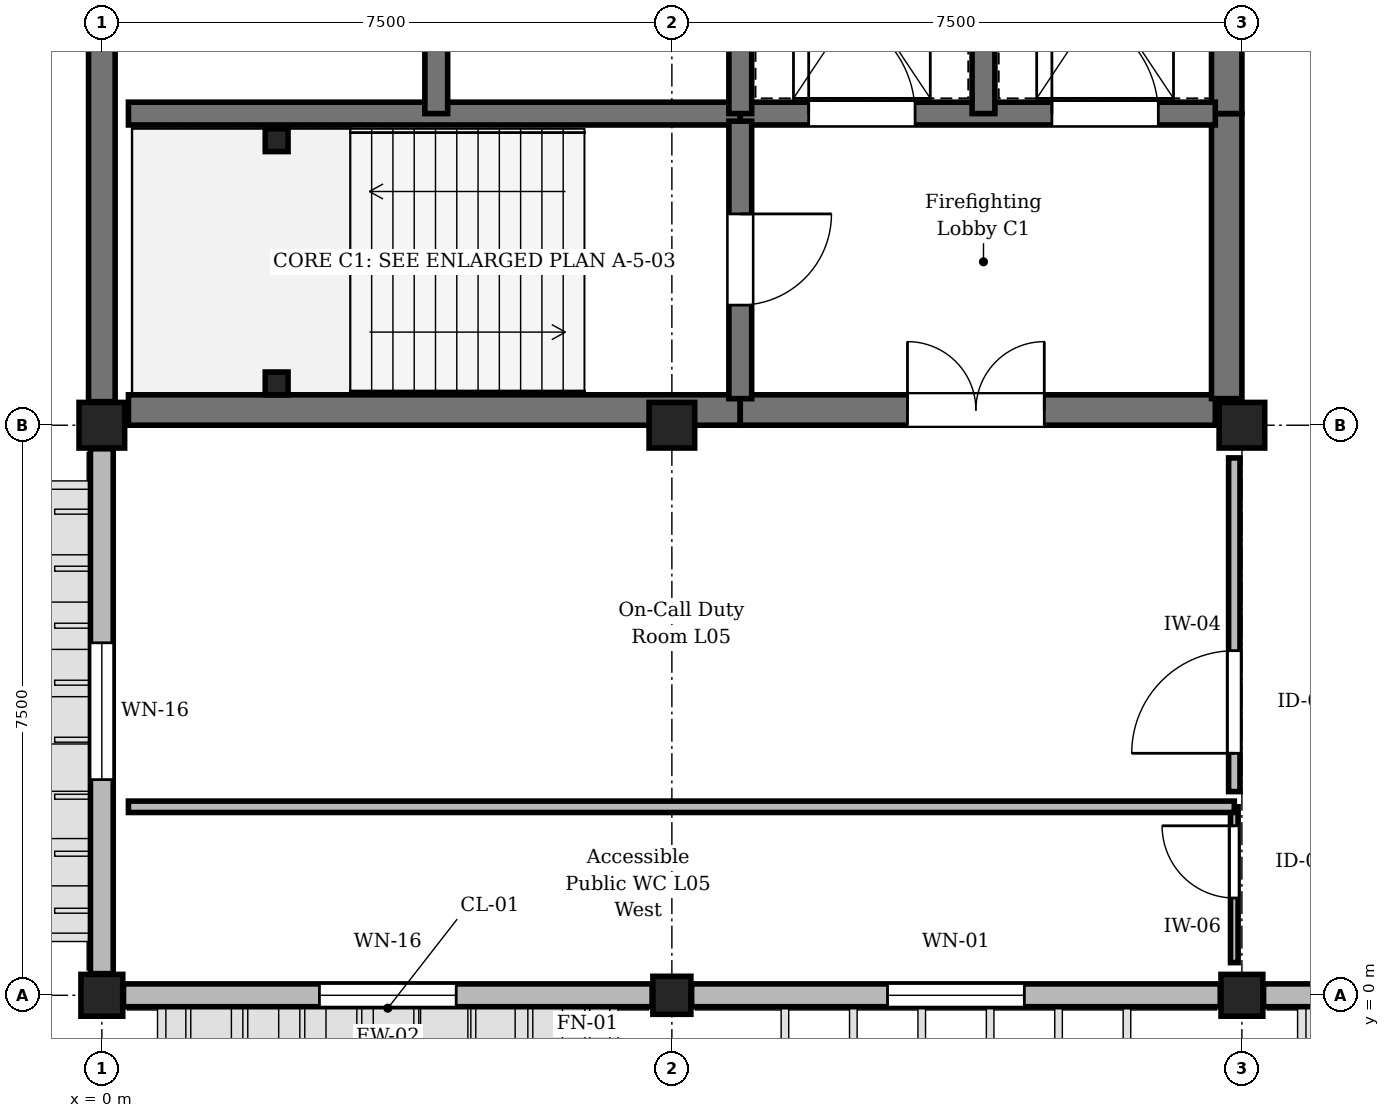
"""IFC4 building model, lengths in metres.
Left out: names, types, materials, properties, quantities, classifications, styles, units other than length and angle.
Written with IfcOpenShell. Run it as: python <this file> out.ifc"""

import sys

from ifc_helpers import new_model, si_unit, direction, frame, frame_2d, origin, origin_with_axes, origin_2d, place, context, subcontext, project, spatial, rectangle, circle, i_section, extrude, element, fill, save


model = new_model("IFC4")
c1 = context("Model", 3, precision=1e-05, world=origin(), true_north=direction((0.0, 1.0)))
c2 = subcontext(c1, "Body", "Model", "MODEL_VIEW")
j1 = project(units=[si_unit("LENGTHUNIT", "METRE"), si_unit("PLANEANGLEUNIT", "RADIAN")], contexts=[c1])
p1 = place(None, origin())
s1 = spatial("IfcSite", under=j1, at=p1, CompositionType="ELEMENT")
p2 = place(p1, origin())
s2 = spatial("IfcBuilding", under=s1, at=p2, CompositionType="ELEMENT")
p3 = place(p2, frame((0.0, 0.0, 21.9)))
s3 = spatial("IfcBuildingStorey", under=s2, at=p3, CompositionType="ELEMENT", Elevation=21.9)
p4 = place(p3, origin_with_axes())
e1 = element("IfcColumn", 1, at=p4, inside=s3, PredefinedType="COLUMN", context=c2, shape_type="SweptSolid", body=[
    extrude(rectangle(XDim=0.55, YDim=0.55, at=origin_2d()), origin(), (0.0, 0.0, 1.0), 4.05),
])
p5 = place(p3, frame((0.0, 7.5, 0.0), z_axis=(0.0, 0.0, 1.0), x_axis=(1.0, 0.0, 0.0)))
e2 = element("IfcColumn", 2, at=p5, inside=s3, PredefinedType="COLUMN", context=c2, shape_type="SweptSolid", body=[
    extrude(rectangle(XDim=0.6, YDim=0.6, at=origin_2d()), origin(), (0.0, 0.0, 1.0), 4.05),
])
p6 = place(p3, frame((7.5, 0.0, 0.0), z_axis=(0.0, 0.0, 1.0), x_axis=(1.0, 0.0, 0.0)))
e3 = element("IfcColumn", 3, at=p6, inside=s3, PredefinedType="COLUMN", context=c2, shape_type="SweptSolid", body=[
    extrude(rectangle(XDim=0.5, YDim=0.5, at=origin_2d()), origin(), (0.0, 0.0, 1.0), 4.05),
])
p7 = place(p3, frame((7.5, 7.5, 0.0), z_axis=(0.0, 0.0, 1.0), x_axis=(1.0, 0.0, 0.0)))
e4 = element("IfcColumn", 4, at=p7, inside=s3, PredefinedType="COLUMN", context=c2, shape_type="SweptSolid", body=[
    extrude(rectangle(XDim=0.6, YDim=0.6, at=origin_2d()), origin(), (0.0, 0.0, 1.0), 4.05),
])
p8 = place(p3, frame((15.0, 0.0, 0.0), z_axis=(0.0, 0.0, 1.0), x_axis=(1.0, 0.0, 0.0)))
e5 = element("IfcColumn", 5, at=p8, inside=s3, PredefinedType="COLUMN", context=c2, shape_type="SweptSolid", body=[
    extrude(rectangle(XDim=0.55, YDim=0.55, at=origin_2d()), origin(), (0.0, 0.0, 1.0), 4.05),
])
p9 = place(p3, frame((15.0, 7.5, 0.0), z_axis=(0.0, 0.0, 1.0), x_axis=(1.0, 0.0, 0.0)))
e6 = element("IfcColumn", 6, at=p9, inside=s3, PredefinedType="COLUMN", context=c2, shape_type="SweptSolid", body=[
    extrude(circle(Radius=0.3, at=origin_2d()), origin(), (0.0, 0.0, 1.0), 4.05),
])
for number, where, z_axis, x_axis in (
    (7, (2.3, 8.05, 0.0), (0.0, 0.0, 1.0), (1.0, 0.0, 0.0)),
    (8, (2.3, 11.25, 0.0), (0.0, 0.0, 1.0), (1.0, 0.0, 0.0)),
):
    element("IfcColumn", number, at=place(p3, frame(where, z_axis=z_axis, x_axis=x_axis)), inside=s3, PredefinedType="COLUMN", context=c2, shape_type="SweptSolid", body=[
        extrude(i_section(OverallWidth=0.3, OverallDepth=0.3, WebThickness=0.011, FlangeThickness=0.019, FilletRadius=0.027, at=origin_2d()), origin(), (0.0, 0.0, 1.0), 4.05),
    ])
p10 = place(p3, frame((7.24, 0.0, 0.0), z_axis=(0.0, 0.0, 1.0), x_axis=(-1.0, 0.0, 0.0)))
e9 = element("IfcWall", 9, at=p10, inside=s3, PredefinedType="STANDARD", context=c2, shape_type="SweptSolid", body=[
    extrude(rectangle(XDim=6.955, YDim=0.3, at=frame_2d((3.478, 0.0))), origin(), (0.0, 0.0, 1.0), 3.17),
])
p11 = place(p10, frame((2.577, 0.0, 0.9)))
e10 = element("IfcOpeningElement", 10, at=p11, cuts=e9, PredefinedType="OPENING", context=c2, shape_type="SweptSolid", body=[
    extrude(rectangle(XDim=1.8, YDim=1.8, at=frame_2d((0.9, 0.9))), frame((0.0, 0.16, 0.0), z_axis=(0.0, -1.0, 0.0), x_axis=(1.0, 0.0, 0.0)), (0.0, 0.0, 1.0), 0.32),
])
p12 = place(p3, frame((0.0, 0.285, 0.0), z_axis=(0.0, 0.0, 1.0), x_axis=(0.0, 1.0, 0.0)))
e11 = element("IfcWall", 11, at=p12, inside=s3, PredefinedType="STANDARD", context=c2, shape_type="SweptSolid", body=[
    extrude(rectangle(XDim=6.905, YDim=0.3, at=frame_2d((3.453, 0.0))), origin(), (0.0, 0.0, 1.0), 3.17),
])
p13 = place(p12, frame((2.552, 0.0, 0.9)))
e12 = element("IfcOpeningElement", 12, at=p13, cuts=e11, PredefinedType="OPENING", context=c2, shape_type="SweptSolid", body=[
    extrude(rectangle(XDim=1.8, YDim=1.8, at=frame_2d((0.9, 0.9))), frame((0.0, 0.16, 0.0), z_axis=(0.0, -1.0, 0.0), x_axis=(1.0, 0.0, 0.0)), (0.0, 0.0, 1.0), 0.32),
])
p14 = place(p3, frame((0.0, 7.81, 0.0), z_axis=(0.0, 0.0, 1.0), x_axis=(0.0, 1.0, 0.0)))
e13 = element("IfcWall", 13, at=p14, inside=s3, PredefinedType="SHEAR", context=c2, shape_type="SweptSolid", body=[
    extrude(rectangle(XDim=6.88, YDim=0.35, at=frame_2d((3.44, 0.0))), origin(), (0.0, 0.0, 1.0), 3.77),
])
p15 = place(p3, frame((14.715, 0.0, 0.0), z_axis=(0.0, 0.0, 1.0), x_axis=(-1.0, 0.0, 0.0)))
e14 = element("IfcWall", 14, at=p15, inside=s3, PredefinedType="STANDARD", context=c2, shape_type="SweptSolid", body=[
    extrude(rectangle(XDim=6.955, YDim=0.3, at=frame_2d((3.478, 0.0))), origin(), (0.0, 0.0, 1.0), 3.17),
])
p16 = place(p15, frame((2.577, 0.0, 0.9)))
e15 = element("IfcOpeningElement", 15, at=p16, cuts=e14, PredefinedType="OPENING", context=c2, shape_type="SweptSolid", body=[
    extrude(rectangle(XDim=1.8, YDim=1.99, at=frame_2d((0.9, 0.995))), frame((0.0, 0.16, 0.0), z_axis=(0.0, -1.0, 0.0), x_axis=(1.0, 0.0, 0.0)), (0.0, 0.0, 1.0), 0.32),
])
p17 = place(p3, frame((22.24, 0.0, 0.0), z_axis=(0.0, 0.0, 1.0), x_axis=(-1.0, 0.0, 0.0)))
e16 = element("IfcWall", 16, at=p17, inside=s3, PredefinedType="STANDARD", context=c2, shape_type="SweptSolid", body=[
    extrude(rectangle(XDim=6.955, YDim=0.3, at=frame_2d((3.478, 0.0))), origin(), (0.0, 0.0, 1.0), 3.17),
])
p18 = place(p17, frame((2.728, 0.0, 0.9)))
e17 = element("IfcOpeningElement", 17, at=p18, cuts=e16, PredefinedType="OPENING", context=c2, shape_type="SweptSolid", body=[
    extrude(rectangle(XDim=1.5, YDim=1.99, at=frame_2d((0.75, 0.995))), frame((0.0, 0.16, 0.0), z_axis=(0.0, -1.0, 0.0), x_axis=(1.0, 0.0, 0.0)), (0.0, 0.0, 1.0), 0.32),
])
p19 = place(p3, frame((0.35, 7.7, 0.0), z_axis=(0.0, 0.0, 1.0), x_axis=(1.0, 0.0, 0.0)))
e18 = element("IfcWall", 18, at=p19, inside=s3, PredefinedType="SHEAR", context=c2, shape_type="SweptSolid", body=[
    extrude(rectangle(XDim=8.05, YDim=0.4, at=frame_2d((4.025, 0.0))), origin(), (0.0, 0.0, 1.0), 3.77),
])
p20 = place(p3, frame((8.4, 7.7, 0.0), z_axis=(0.0, 0.0, 1.0), x_axis=(1.0, 0.0, 0.0)))
e19 = element("IfcWall", 19, at=p20, inside=s3, PredefinedType="SHEAR", context=c2, shape_type="SweptSolid", body=[
    extrude(rectangle(XDim=6.25, YDim=0.4, at=frame_2d((3.125, 0.0))), origin(), (0.0, 0.0, 1.0), 3.77),
])
p21 = place(p20, frame((2.2, 0.0, 0.0)))
e20 = element("IfcOpeningElement", 20, at=p21, cuts=e19, PredefinedType="OPENING", context=c2, shape_type="SweptSolid", body=[
    extrude(rectangle(XDim=1.8, YDim=2.25, at=frame_2d((0.9, 1.125))), frame((0.0, 0.21, 0.0), z_axis=(0.0, -1.0, 0.0), x_axis=(1.0, 0.0, 0.0)), (0.0, 0.0, 1.0), 0.42),
])
p22 = place(p3, frame((14.8, 7.85, 0.0), z_axis=(0.0, 0.0, 1.0), x_axis=(0.0, 1.0, 0.0)))
e21 = element("IfcWall", 21, at=p22, inside=s3, PredefinedType="SHEAR", context=c2, shape_type="SweptSolid", body=[
    extrude(rectangle(XDim=3.75, YDim=0.4, at=frame_2d((1.875, 0.0))), origin(), (0.0, 0.0, 1.0), 3.77),
])
p23 = place(p3, frame((14.8, 11.6, 0.0), z_axis=(0.0, 0.0, 1.0), x_axis=(0.0, 1.0, 0.0)))
e22 = element("IfcWall", 22, at=p23, inside=s3, PredefinedType="SHEAR", context=c2, shape_type="SweptSolid", body=[
    extrude(rectangle(XDim=3.05, YDim=0.4, at=frame_2d((1.525, 0.0))), origin(), (0.0, 0.0, 1.0), 3.77),
])
p24 = place(p3, frame((0.35, 11.6, 0.0), z_axis=(0.0, 0.0, 1.0), x_axis=(1.0, 0.0, 0.0)))
e23 = element("IfcWall", 23, at=p24, inside=s3, PredefinedType="SHEAR", context=c2, shape_type="SweptSolid", body=[
    extrude(rectangle(XDim=8.05, YDim=0.3, at=frame_2d((4.025, 0.0))), origin(), (0.0, 0.0, 1.0), 3.77),
])
p25 = place(p3, frame((8.4, 11.6, 0.0), z_axis=(0.0, 0.0, 1.0), x_axis=(1.0, 0.0, 0.0)))
e24 = element("IfcWall", 24, at=p25, inside=s3, PredefinedType="SHEAR", context=c2, shape_type="SweptSolid", body=[
    extrude(rectangle(XDim=6.25, YDim=0.3, at=frame_2d((3.125, 0.0))), origin(), (0.0, 0.0, 1.0), 3.77),
])
p26 = place(p25, frame((0.9, 0.0, 0.0)))
e25 = element("IfcOpeningElement", 25, at=p26, cuts=e24, PredefinedType="OPENING", context=c2, shape_type="SweptSolid", body=[
    extrude(rectangle(XDim=1.4, YDim=2.25, at=frame_2d((0.7, 1.125))), frame((0.0, 0.16, 0.0), z_axis=(0.0, -1.0, 0.0), x_axis=(1.0, 0.0, 0.0)), (0.0, 0.0, 1.0), 0.32),
])
p27 = place(p25, frame((4.1, 0.0, 0.0)))
e26 = element("IfcOpeningElement", 26, at=p27, cuts=e24, PredefinedType="OPENING", context=c2, shape_type="SweptSolid", body=[
    extrude(rectangle(XDim=1.4, YDim=2.25, at=frame_2d((0.7, 1.125))), frame((0.0, 0.16, 0.0), z_axis=(0.0, -1.0, 0.0), x_axis=(1.0, 0.0, 0.0)), (0.0, 0.0, 1.0), 0.32),
])
p28 = place(p3, frame((8.4, 11.5, 0.0), z_axis=(0.0, 0.0, 1.0), x_axis=(0.0, -1.0, 0.0)))
e27 = element("IfcWall", 27, at=p28, inside=s3, PredefinedType="SHEAR", context=c2, shape_type="SweptSolid", body=[
    extrude(rectangle(XDim=3.65, YDim=0.3, at=frame_2d((1.825, 0.0))), origin(), (0.0, 0.0, 1.0), 3.77),
])
p29 = place(p28, frame((1.22, 0.0, 0.0)))
e28 = element("IfcOpeningElement", 28, at=p29, cuts=e27, PredefinedType="OPENING", context=c2, shape_type="SweptSolid", body=[
    extrude(rectangle(XDim=1.2, YDim=2.25, at=frame_2d((0.6, 1.125))), frame((0.0, 0.16, 0.0), z_axis=(0.0, -1.0, 0.0), x_axis=(1.0, 0.0, 0.0)), (0.0, 0.0, 1.0), 0.32),
])
for number, where, z_axis, x_axis in (
    (29, (4.4, 11.6, 0.0), (0.0, 0.0, 1.0), (0.0, 1.0, 0.0)),
    (30, (8.4, 11.6, 0.0), (0.0, 0.0, 1.0), (0.0, 1.0, 0.0)),
    (31, (11.6, 11.6, 0.0), (0.0, 0.0, 1.0), (0.0, 1.0, 0.0)),
):
    element("IfcWall", number, at=place(p3, frame(where, z_axis=z_axis, x_axis=x_axis)), inside=s3, PredefinedType="SHEAR", context=c2, shape_type="SweptSolid", body=[
        extrude(rectangle(XDim=3.15, YDim=0.3, at=frame_2d((1.575, 0.0))), origin(), (0.0, 0.0, 1.0), 3.77),
    ])
p30 = place(p3, frame((14.9, 0.43, 0.0), z_axis=(0.0, 0.0, 1.0), x_axis=(0.0, 1.0, 0.0)))
e32 = element("IfcWall", 32, at=p30, inside=s3, PredefinedType="PARTITIONING", context=c2, shape_type="SweptSolid", body=[
    extrude(rectangle(XDim=2.05, YDim=0.1, at=frame_2d((1.025, 0.0))), origin(), (0.0, 0.0, 1.0), 3.205),
])
p31 = place(p30, frame((0.85, 0.0, 0.0)))
e33 = element("IfcOpeningElement", 33, at=p31, cuts=e32, PredefinedType="OPENING", context=c2, shape_type="SweptSolid", body=[
    extrude(rectangle(XDim=0.95, YDim=2.15, at=frame_2d((0.475, 1.075))), frame((0.0, 0.06, 0.0), z_axis=(0.0, -1.0, 0.0), x_axis=(1.0, 0.0, 0.0)), (0.0, 0.0, 1.0), 0.12),
])
p32 = place(p3, frame((14.9, 2.68, 0.0), z_axis=(0.0, 0.0, 1.0), x_axis=(0.0, 1.0, 0.0)))
e34 = element("IfcWall", 34, at=p32, inside=s3, PredefinedType="PARTITIONING", context=c2, shape_type="SweptSolid", body=[
    extrude(rectangle(XDim=4.39, YDim=0.15, at=frame_2d((2.195, 0.0))), origin(), (0.0, 0.0, 1.0), 3.205),
])
p33 = place(p32, frame((0.504, 0.0, 0.0)))
e35 = element("IfcOpeningElement", 35, at=p33, cuts=e34, PredefinedType="OPENING", context=c2, shape_type="SweptSolid", body=[
    extrude(rectangle(XDim=1.35, YDim=2.25, at=frame_2d((0.675, 1.125))), frame((0.0, 0.085, 0.0), z_axis=(0.0, -1.0, 0.0), x_axis=(1.0, 0.0, 0.0)), (0.0, 0.0, 1.0), 0.17),
])
p34 = place(p3, frame((0.35, 2.48, 0.0), z_axis=(0.0, 0.0, 1.0), x_axis=(1.0, 0.0, 0.0)))
e36 = element("IfcWall", 36, at=p34, inside=s3, PredefinedType="PARTITIONING", context=c2, shape_type="SweptSolid", body=[
    extrude(rectangle(XDim=14.55, YDim=0.15, at=frame_2d((7.275, 0.0))), origin(), (0.0, 0.0, 1.0), 3.755),
])
p35 = place(p11, origin())
e37 = element("IfcWindow", 37, at=p35, inside=s3, PartitioningType="SINGLE_PANEL", PredefinedType="WINDOW", context=c2, shape_type="SweptSolid", body=[
    extrude(rectangle(XDim=1.8, YDim=1.8, at=frame_2d((0.9, 0.9))), frame((0.0, 0.03, 0.0), z_axis=(0.0, -1.0, 0.0), x_axis=(1.0, 0.0, 0.0)), (0.0, 0.0, 1.0), 0.06),
])
fill(e10, e37)
p36 = place(p13, origin())
e38 = element("IfcWindow", 38, at=p36, inside=s3, PartitioningType="SINGLE_PANEL", PredefinedType="WINDOW", context=c2, shape_type="SweptSolid", body=[
    extrude(rectangle(XDim=1.8, YDim=1.8, at=frame_2d((0.9, 0.9))), frame((0.0, 0.03, 0.0), z_axis=(0.0, -1.0, 0.0), x_axis=(1.0, 0.0, 0.0)), (0.0, 0.0, 1.0), 0.06),
])
fill(e12, e38)
p37 = place(p16, origin())
e39 = element("IfcWindow", 39, at=p37, inside=s3, PartitioningType="SINGLE_PANEL", PredefinedType="WINDOW", context=c2, shape_type="SweptSolid", body=[
    extrude(rectangle(XDim=1.8, YDim=1.99, at=frame_2d((0.9, 0.995))), frame((0.0, 0.03, 0.0), z_axis=(0.0, -1.0, 0.0), x_axis=(1.0, 0.0, 0.0)), (0.0, 0.0, 1.0), 0.06),
])
fill(e15, e39)
p38 = place(p21, origin())
e40 = element("IfcDoor", 40, at=p38, inside=s3, OperationType="DOUBLE_DOOR_SINGLE_SWING", PredefinedType="DOOR", context=c2, shape_type="SweptSolid", body=[
    extrude(rectangle(XDim=1.8, YDim=2.25, at=frame_2d((0.9, 1.125))), frame((0.0, 0.025, 0.0), z_axis=(0.0, -1.0, 0.0), x_axis=(1.0, 0.0, 0.0)), (0.0, 0.0, 1.0), 0.05),
])
fill(e20, e40)
p39 = place(p26, origin())
e41 = element("IfcDoor", 41, at=p39, inside=s3, OperationType="DOUBLE_DOOR_SLIDING", PredefinedType="DOOR", context=c2, shape_type="SweptSolid", body=[
    extrude(rectangle(XDim=1.4, YDim=2.25, at=frame_2d((0.7, 1.125))), frame((0.0, 0.025, 0.0), z_axis=(0.0, -1.0, 0.0), x_axis=(1.0, 0.0, 0.0)), (0.0, 0.0, 1.0), 0.05),
])
fill(e25, e41)
p40 = place(p27, origin())
e42 = element("IfcDoor", 42, at=p40, inside=s3, OperationType="DOUBLE_DOOR_SLIDING", PredefinedType="DOOR", context=c2, shape_type="SweptSolid", body=[
    extrude(rectangle(XDim=1.4, YDim=2.25, at=frame_2d((0.7, 1.125))), frame((0.0, 0.025, 0.0), z_axis=(0.0, -1.0, 0.0), x_axis=(1.0, 0.0, 0.0)), (0.0, 0.0, 1.0), 0.05),
])
fill(e26, e42)
p41 = place(p29, origin())
e43 = element("IfcDoor", 43, at=p41, inside=s3, OperationType="SINGLE_SWING_LEFT", PredefinedType="DOOR", context=c2, shape_type="SweptSolid", body=[
    extrude(rectangle(XDim=1.2, YDim=2.25, at=frame_2d((0.6, 1.125))), frame((0.0, 0.025, 0.0), z_axis=(0.0, -1.0, 0.0), x_axis=(1.0, 0.0, 0.0)), (0.0, 0.0, 1.0), 0.05),
])
fill(e28, e43)
p42 = place(p31, origin())
e44 = element("IfcDoor", 44, at=p42, inside=s3, OperationType="SINGLE_SWING_RIGHT", PredefinedType="DOOR", context=c2, shape_type="SweptSolid", body=[
    extrude(rectangle(XDim=0.95, YDim=2.15, at=frame_2d((0.475, 1.075))), frame((0.0, 0.025, 0.0), z_axis=(0.0, -1.0, 0.0), x_axis=(1.0, 0.0, 0.0)), (0.0, 0.0, 1.0), 0.05),
])
fill(e33, e44)
p43 = place(p33, origin())
e45 = element("IfcDoor", 45, at=p43, inside=s3, OperationType="SINGLE_SWING_LEFT", PredefinedType="DOOR", context=c2, shape_type="SweptSolid", body=[
    extrude(rectangle(XDim=1.35, YDim=2.25, at=frame_2d((0.675, 1.125))), frame((0.0, 0.025, 0.0), z_axis=(0.0, -1.0, 0.0), x_axis=(1.0, 0.0, 0.0)), (0.0, 0.0, 1.0), 0.05),
])
fill(e35, e45)
save(model, sys.argv[1])
